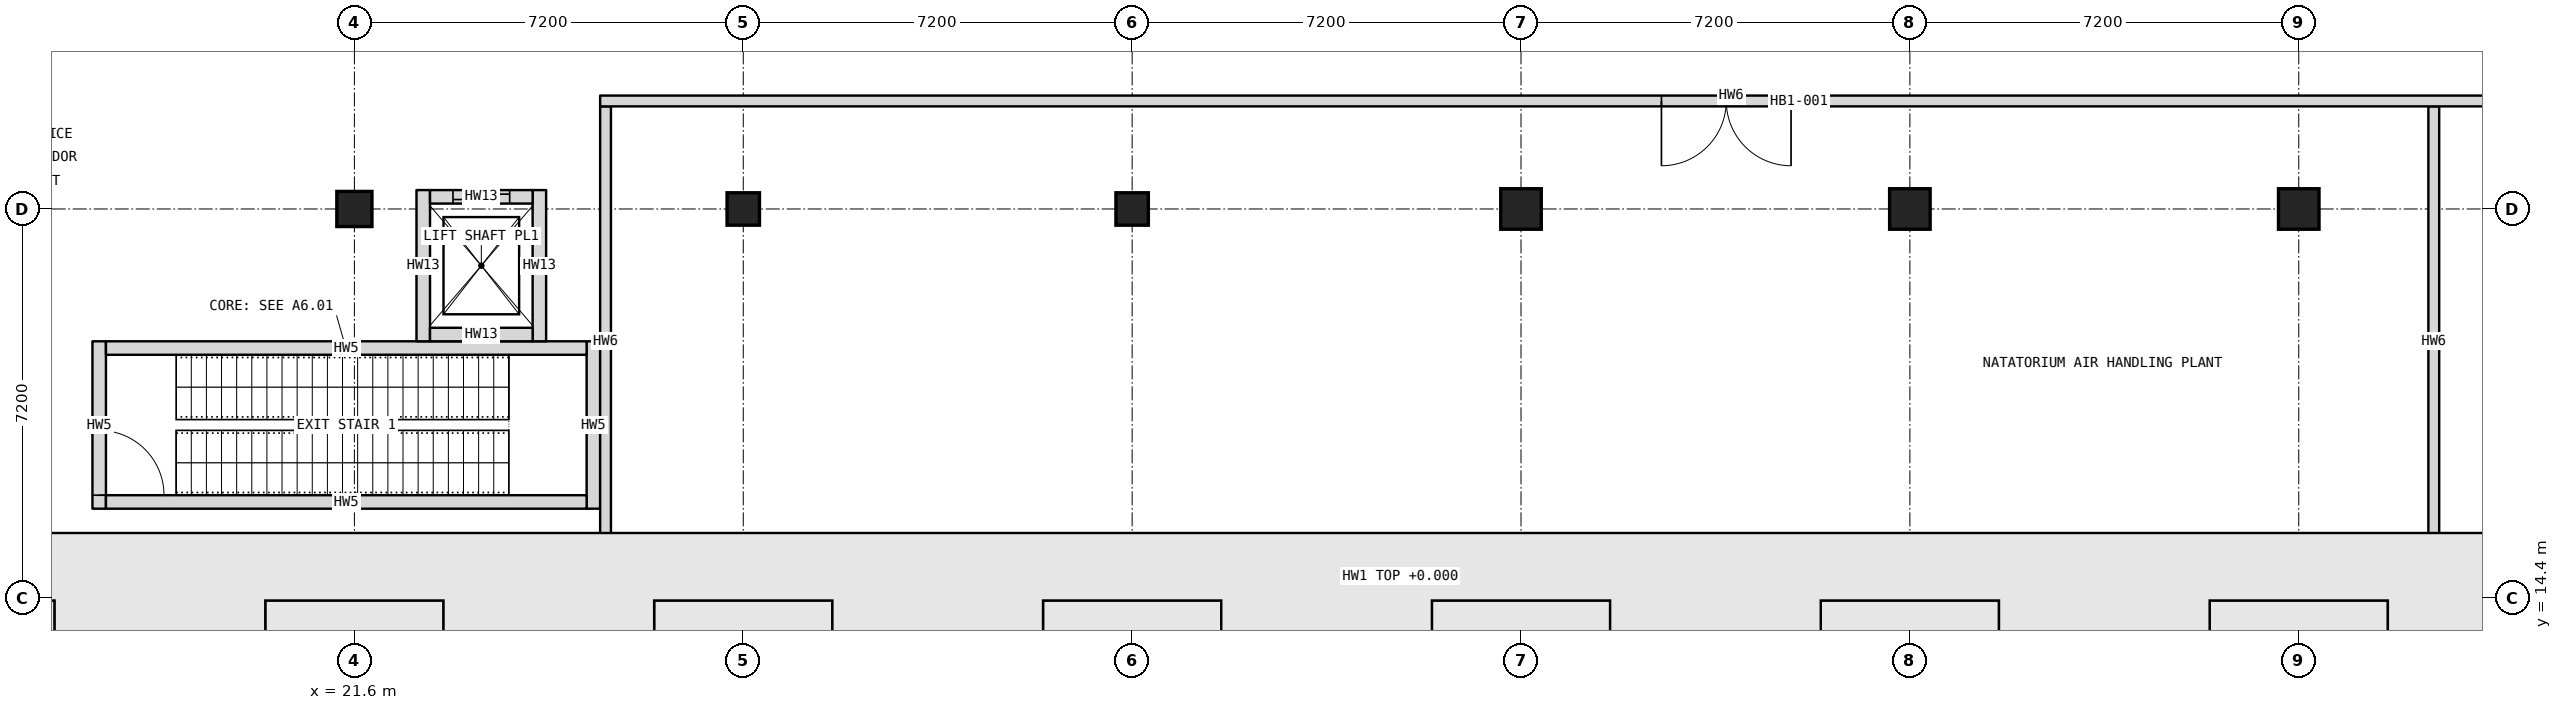
"""IFC4 building model, lengths in metres.
Left out: names, types, materials, properties, quantities, classifications, styles, units other than length and angle.
Written with IfcOpenShell. Run it as: python <this file> out.ifc"""

import sys

from ifc_helpers import new_model, si_unit, direction, frame, frame_2d, origin, origin_2d, place, context, subcontext, project, spatial, rectangle, extrude, element, fill, save


model = new_model("IFC4")
c1 = context("Model", 3, precision=1e-05, world=origin(), true_north=direction((0.0, 1.0)))
c2 = subcontext(c1, "Body", "Model", "MODEL_VIEW")
j1 = project(units=[si_unit("LENGTHUNIT", "METRE"), si_unit("PLANEANGLEUNIT", "RADIAN")], contexts=[c1])
p1 = place(None, origin())
s1 = spatial("IfcSite", under=j1, at=p1, CompositionType="ELEMENT")
p2 = place(p1, origin())
s2 = spatial("IfcBuilding", under=s1, at=p2, CompositionType="ELEMENT")
p3 = place(p2, frame((0.0, 0.0, -8.0)))
s3 = spatial("IfcBuildingStorey", under=s2, at=p3, CompositionType="ELEMENT", Elevation=-8.0)
p4 = place(p3, frame((13.9, 14.4, 0.0), z_axis=(0.0, 0.0, 1.0), x_axis=(1.0, 0.0, 0.0)))
e1 = element("IfcWall", 1, at=p4, inside=s3, PredefinedType="SOLIDWALL", context=c2, shape_type="SweptSolid", body=[
    extrude(rectangle(XDim=130.6, YDim=0.8, at=frame_2d((65.3, 0.0))), origin(), (0.0, 0.0, 1.0), 8.0),
])
for number, where, z_axis, x_axis in (
    (2, (21.6, 11.4, -0.8), (0.0, 0.0, 1.0), (0.0, 1.0, 0.0)),
    (3, (28.8, 11.4, -0.8), (0.0, 0.0, 1.0), (0.0, 1.0, 0.0)),
    (4, (36.0, 11.4, -0.8), (0.0, 0.0, 1.0), (0.0, 1.0, 0.0)),
    (5, (43.2, 11.4, -0.8), (0.0, 0.0, 1.0), (0.0, 1.0, 0.0)),
    (6, (50.4, 11.4, -0.8), (0.0, 0.0, 1.0), (0.0, 1.0, 0.0)),
    (7, (57.6, 11.4, -0.8), (0.0, 0.0, 1.0), (0.0, 1.0, 0.0)),
):
    element("IfcWall", number, at=place(p3, frame(where, z_axis=z_axis, x_axis=x_axis)), inside=s3, PredefinedType="SOLIDWALL", context=c2, shape_type="SweptSolid", body=[
        extrude(rectangle(XDim=2.6, YDim=1.0, at=frame_2d((1.3, 0.0))), origin(), (0.0, 0.0, 1.0), 8.8),
    ])
p5 = place(p3, frame((21.6, 21.6, 0.0), z_axis=(0.0, 0.0, 1.0), x_axis=(1.0, 0.0, 0.0)))
e8 = element("IfcColumn", 8, at=p5, inside=s3, PredefinedType="COLUMN", context=c2, shape_type="SweptSolid", body=[
    extrude(rectangle(XDim=0.65, YDim=0.65, at=origin_2d()), origin(), (0.0, 0.0, 1.0), 7.595),
])
for number, where, z_axis, x_axis in (
    (9, (28.8, 21.6, 0.0), (0.0, 0.0, 1.0), (1.0, 0.0, 0.0)),
    (10, (36.0, 21.6, 0.0), (0.0, 0.0, 1.0), (1.0, 0.0, 0.0)),
):
    element("IfcColumn", number, at=place(p3, frame(where, z_axis=z_axis, x_axis=x_axis)), inside=s3, PredefinedType="COLUMN", context=c2, shape_type="SweptSolid", body=[
        extrude(rectangle(XDim=0.6, YDim=0.6, at=origin_2d()), origin(), (0.0, 0.0, 1.0), 7.595),
    ])
for number, where, z_axis, x_axis in (
    (11, (43.2, 21.6, 0.0), (0.0, 0.0, 1.0), (1.0, 0.0, 0.0)),
    (12, (50.4, 21.6, 0.0), (0.0, 0.0, 1.0), (1.0, 0.0, 0.0)),
    (13, (57.6, 21.6, 0.0), (0.0, 0.0, 1.0), (1.0, 0.0, 0.0)),
):
    element("IfcColumn", number, at=place(p3, frame(where, z_axis=z_axis, x_axis=x_axis)), inside=s3, PredefinedType="COLUMN", context=c2, shape_type="SweptSolid", body=[
        extrude(rectangle(XDim=0.75, YDim=0.75, at=origin_2d()), origin(), (0.0, 0.0, 1.0), 7.595),
    ])
p6 = place(p3, frame((16.875, 16.05, 0.0), z_axis=(0.0, 0.0, 1.0), x_axis=(0.0, 1.0, 0.0)))
e14 = element("IfcWall", 14, at=p6, inside=s3, PredefinedType="SOLIDWALL", context=c2, shape_type="SweptSolid", body=[
    extrude(rectangle(XDim=3.1, YDim=0.25, at=frame_2d((1.55, 0.0))), origin(), (0.0, 0.0, 1.0), 7.595),
])
p7 = place(p6, frame((0.25, 0.0, 0.0)))
e15 = element("IfcOpeningElement", 15, at=p7, cuts=e14, PredefinedType="OPENING", context=c2, shape_type="SweptSolid", body=[
    extrude(rectangle(XDim=1.2, YDim=2.1, at=frame_2d((0.6, 1.05))), frame((0.0, 0.135, 0.0), z_axis=(0.0, -1.0, 0.0), x_axis=(1.0, 0.0, 0.0)), (0.0, 0.0, 1.0), 0.27),
])
p8 = place(p3, frame((26.025, 16.05, 0.0), z_axis=(0.0, 0.0, 1.0), x_axis=(0.0, 1.0, 0.0)))
e16 = element("IfcWall", 16, at=p8, inside=s3, PredefinedType="SOLIDWALL", context=c2, shape_type="SweptSolid", body=[
    extrude(rectangle(XDim=3.1, YDim=0.25, at=frame_2d((1.55, 0.0))), origin(), (0.0, 0.0, 1.0), 7.595),
])
for number, where, z_axis, x_axis in (
    (17, (17.0, 16.175, 0.0), (0.0, 0.0, 1.0), (1.0, 0.0, 0.0)),
    (18, (17.0, 19.025, 0.0), (0.0, 0.0, 1.0), (1.0, 0.0, 0.0)),
):
    element("IfcWall", number, at=place(p3, frame(where, z_axis=z_axis, x_axis=x_axis)), inside=s3, PredefinedType="SOLIDWALL", context=c2, shape_type="SweptSolid", body=[
        extrude(rectangle(XDim=8.9, YDim=0.25, at=frame_2d((4.45, 0.0))), origin(), (0.0, 0.0, 1.0), 7.595),
    ])
for number, where, z_axis, x_axis in (
    (19, (22.875, 19.15, -1.2), (0.0, 0.0, 1.0), (0.0, 1.0, 0.0)),
    (20, (25.025, 19.15, -1.2), (0.0, 0.0, 1.0), (0.0, 1.0, 0.0)),
):
    element("IfcWall", number, at=place(p3, frame(where, z_axis=z_axis, x_axis=x_axis)), inside=s3, PredefinedType="SOLIDWALL", context=c2, shape_type="SweptSolid", body=[
        extrude(rectangle(XDim=2.8, YDim=0.25, at=frame_2d((1.4, 0.0))), origin(), (0.0, 0.0, 1.0), 8.795),
    ])
p9 = place(p3, frame((23.0, 19.275, -1.2), z_axis=(0.0, 0.0, 1.0), x_axis=(1.0, 0.0, 0.0)))
e21 = element("IfcWall", 21, at=p9, inside=s3, PredefinedType="SOLIDWALL", context=c2, shape_type="SweptSolid", body=[
    extrude(rectangle(XDim=1.9, YDim=0.25, at=frame_2d((0.95, 0.0))), origin(), (0.0, 0.0, 1.0), 8.795),
])
p10 = place(p3, frame((23.0, 21.825, -1.2), z_axis=(0.0, 0.0, 1.0), x_axis=(1.0, 0.0, 0.0)))
e22 = element("IfcWall", 22, at=p10, inside=s3, PredefinedType="SOLIDWALL", context=c2, shape_type="SweptSolid", body=[
    extrude(rectangle(XDim=1.9, YDim=0.25, at=frame_2d((0.95, 0.0))), origin(), (0.0, 0.0, 1.0), 8.795),
])
p11 = place(p10, frame((0.425, 0.0, 1.2)))
e23 = element("IfcOpeningElement", 23, at=p11, cuts=e22, PredefinedType="OPENING", context=c2, shape_type="SweptSolid", body=[
    extrude(rectangle(XDim=1.05, YDim=2.1, at=frame_2d((0.525, 1.05))), frame((0.0, 0.135, 0.0), z_axis=(0.0, -1.0, 0.0), x_axis=(1.0, 0.0, 0.0)), (0.0, 0.0, 1.0), 0.27),
])
for number, where, z_axis, x_axis in (
    (24, (26.25, 14.8, 0.0), (0.0, 0.0, 1.0), (0.0, 1.0, 0.0)),
    (25, (60.1, 14.8, 0.0), (0.0, 0.0, 1.0), (0.0, 1.0, 0.0)),
):
    element("IfcWall", number, at=place(p3, frame(where, z_axis=z_axis, x_axis=x_axis)), inside=s3, PredefinedType="PARTITIONING", context=c2, shape_type="SweptSolid", body=[
        extrude(rectangle(XDim=8.7, YDim=0.2, at=frame_2d((4.35, 0.0))), origin(), (0.0, 0.0, 1.0), 7.595),
    ])
p12 = place(p3, frame((26.15, 23.6, 0.0), z_axis=(0.0, 0.0, 1.0), x_axis=(1.0, 0.0, 0.0)))
e26 = element("IfcWall", 26, at=p12, inside=s3, PredefinedType="PARTITIONING", context=c2, shape_type="SweptSolid", body=[
    extrude(rectangle(XDim=106.25, YDim=0.2, at=frame_2d((53.125, 0.0))), origin(), (0.0, 0.0, 1.0), 7.595),
])
p13 = place(p12, frame((19.65, 0.0, 0.0)))
e27 = element("IfcOpeningElement", 27, at=p13, cuts=e26, PredefinedType="OPENING", context=c2, shape_type="SweptSolid", body=[
    extrude(rectangle(XDim=2.4, YDim=2.4, at=frame_2d((1.2, 1.2))), frame((0.0, 0.11, 0.0), z_axis=(0.0, -1.0, 0.0), x_axis=(1.0, 0.0, 0.0)), (0.0, 0.0, 1.0), 0.22),
])
p14 = place(p12, frame((42.65, 0.0, 0.0)))
e28 = element("IfcOpeningElement", 28, at=p14, cuts=e26, PredefinedType="OPENING", context=c2, shape_type="SweptSolid", body=[
    extrude(rectangle(XDim=2.4, YDim=2.4, at=frame_2d((1.2, 1.2))), frame((0.0, 0.11, 0.0), z_axis=(0.0, -1.0, 0.0), x_axis=(1.0, 0.0, 0.0)), (0.0, 0.0, 1.0), 0.22),
])
p15 = place(p12, frame((65.15, 0.0, 0.0)))
e29 = element("IfcOpeningElement", 29, at=p15, cuts=e26, PredefinedType="OPENING", context=c2, shape_type="SweptSolid", body=[
    extrude(rectangle(XDim=1.4, YDim=2.1, at=frame_2d((0.7, 1.05))), frame((0.0, 0.11, 0.0), z_axis=(0.0, -1.0, 0.0), x_axis=(1.0, 0.0, 0.0)), (0.0, 0.0, 1.0), 0.22),
])
p16 = place(p12, frame((79.35, 0.0, 0.0)))
e30 = element("IfcOpeningElement", 30, at=p16, cuts=e26, PredefinedType="OPENING", context=c2, shape_type="SweptSolid", body=[
    extrude(rectangle(XDim=1.0, YDim=2.1, at=frame_2d((0.5, 1.05))), frame((0.0, 0.11, 0.0), z_axis=(0.0, -1.0, 0.0), x_axis=(1.0, 0.0, 0.0)), (0.0, 0.0, 1.0), 0.22),
])
p17 = place(p12, frame((93.35, 0.0, 0.0)))
e31 = element("IfcOpeningElement", 31, at=p17, cuts=e26, PredefinedType="OPENING", context=c2, shape_type="SweptSolid", body=[
    extrude(rectangle(XDim=1.0, YDim=2.1, at=frame_2d((0.5, 1.05))), frame((0.0, 0.11, 0.0), z_axis=(0.0, -1.0, 0.0), x_axis=(1.0, 0.0, 0.0)), (0.0, 0.0, 1.0), 0.22),
])
p18 = place(p13, frame((2.4, 0.0, 0.0), z_axis=(0.0, 0.0, 1.0), x_axis=(-1.0, 0.0, 0.0)))
e32 = element("IfcDoor", 32, at=p18, inside=s3, OperationType="DOUBLE_DOOR_SINGLE_SWING", PredefinedType="DOOR", context=c2, shape_type="SweptSolid", body=[
    extrude(rectangle(XDim=2.4, YDim=2.4, at=frame_2d((1.2, 1.2))), frame((0.0, 0.025, 0.0), z_axis=(0.0, -1.0, 0.0), x_axis=(1.0, 0.0, 0.0)), (0.0, 0.0, 1.0), 0.05),
])
fill(e27, e32)
p19 = place(p7, frame((1.2, 0.0, 0.0), z_axis=(0.0, 0.0, 1.0), x_axis=(-1.0, 0.0, 0.0)))
e33 = element("IfcDoor", 33, at=p19, inside=s3, OperationType="SINGLE_SWING_RIGHT", PredefinedType="DOOR", context=c2, shape_type="SweptSolid", body=[
    extrude(rectangle(XDim=1.2, YDim=2.1, at=frame_2d((0.6, 1.05))), frame((0.0, 0.025, 0.0), z_axis=(0.0, -1.0, 0.0), x_axis=(1.0, 0.0, 0.0)), (0.0, 0.0, 1.0), 0.05),
])
fill(e15, e33)
p20 = place(p11, origin())
e34 = element("IfcDoor", 34, at=p20, inside=s3, OperationType="DOUBLE_DOOR_SLIDING", PredefinedType="DOOR", context=c2, shape_type="SweptSolid", body=[
    extrude(rectangle(XDim=1.05, YDim=2.1, at=frame_2d((0.525, 1.05))), frame((0.0, 0.025, 0.0), z_axis=(0.0, -1.0, 0.0), x_axis=(1.0, 0.0, 0.0)), (0.0, 0.0, 1.0), 0.05),
])
fill(e23, e34)
save(model, sys.argv[1])
